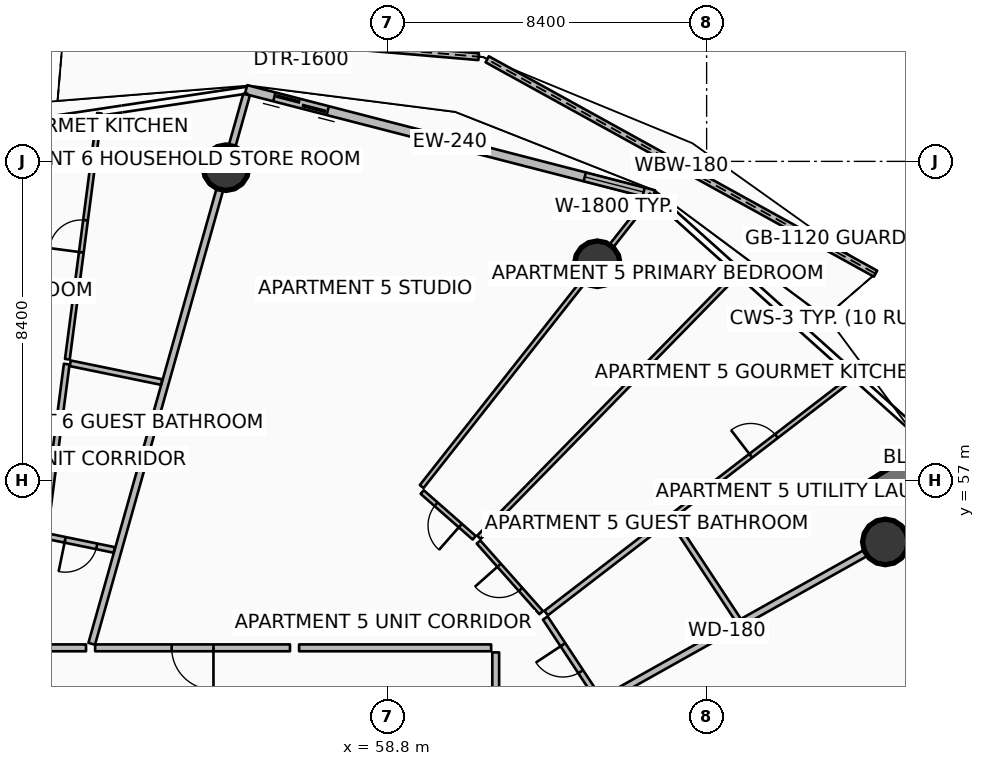
"""IFC4 building model, lengths in metres.
Left out: names, types, materials, properties, quantities, classifications, styles, units other than length and angle.
Written with IfcOpenShell. Run it as: python <this file> out.ifc"""

import sys

from ifc_helpers import new_model, si_unit, direction, frame, frame_2d, origin, origin_2d, place, context, subcontext, project, spatial, polyline, rectangle, circle, outline, extrude, element, fill, save


model = new_model("IFC4")
c1 = context("Model", 3, precision=1e-05, world=origin(), true_north=direction((0.0, 1.0)))
c2 = subcontext(c1, "Body", "Model", "MODEL_VIEW")
j1 = project(units=[si_unit("LENGTHUNIT", "METRE"), si_unit("PLANEANGLEUNIT", "RADIAN")], contexts=[c1])
p1 = place(None, origin())
s1 = spatial("IfcSite", under=j1, at=p1, CompositionType="ELEMENT")
p2 = place(p1, origin())
s2 = spatial("IfcBuilding", under=s1, at=p2, CompositionType="ELEMENT")
p3 = place(p2, frame((0.0, 0.0, 86.4)))
s3 = spatial("IfcBuildingStorey", under=s2, at=p3, CompositionType="ELEMENT", Elevation=86.4)
p4 = place(p3, frame((71.469, 56.665, 0.0), z_axis=(0.0, 0.0, 1.0), x_axis=(0.848053161125, 0.529911158502, 0.0)))
e1 = element("IfcWall", 1, at=p4, inside=s3, PredefinedType="SOLIDWALL", context=c2, shape_type="SweptSolid", body=[
    extrude(rectangle(XDim=3.5, YDim=0.55, at=frame_2d((1.75, 0.0))), origin(), (0.0, 0.0, 1.0), 3.75),
])
for number, where, z_axis, x_axis in (
    (2, (71.903, 55.386, 0.0), (0.0, 0.0, 1.0), (1.0, 0.0, 0.0)),
    (3, (64.323, 62.706, 0.0), (0.0, 0.0, 1.0), (1.0, 0.0, 0.0)),
    (4, (54.553, 65.234, 0.0), (0.0, 0.0, 1.0), (1.0, 0.0, 0.0)),
):
    element("IfcColumn", number, at=place(p3, frame(where, z_axis=z_axis, x_axis=x_axis)), inside=s3, PredefinedType="COLUMN", context=c2, shape_type="SweptSolid", body=[
        extrude(circle(Radius=0.6, at=origin_2d()), origin(), (0.0, 0.0, 1.0), 3.5),
    ])
p5 = place(p3, frame((71.644, 62.445, 0.0), z_axis=(0.0, 0.0, 1.0), x_axis=(-0.875456537623, 0.483296855704, 0.0)))
e5 = element("IfcWall", 5, at=p5, inside=s3, PredefinedType="PARAPET", context=c2, shape_type="SweptSolid", body=[
    extrude(outline(polyline([(0.0, 0.0), (11.672, 0.0), (11.672, 1.148), (5.836, 1.127), (0.0, 1.224), (0.0, 0.0)])), frame((0.0, 0.09, 0.0), z_axis=(0.0, -1.0, 0.0), x_axis=(1.0, 0.0, 0.0)), (0.0, 0.0, 1.0), 0.18),
])
p6 = place(p3, frame((61.201, 68.154, 0.0), z_axis=(0.0, 0.0, 1.0), x_axis=(-0.996375069037, 0.08506892383, 0.0)))
e6 = element("IfcWall", 6, at=p6, inside=s3, PredefinedType="PARAPET", context=c2, shape_type="SweptSolid", body=[
    extrude(outline(polyline([(0.0, 0.0), (10.943, 0.0), (10.943, 1.483), (5.471, 1.284), (0.0, 1.148), (0.0, 0.0)])), frame((0.0, 0.09, 0.0), z_axis=(0.0, -1.0, 0.0), x_axis=(1.0, 0.0, 0.0)), (0.0, 0.0, 1.0), 0.18),
])
p7 = place(p3, frame((65.814, 64.523, 0.0), z_axis=(0.0, 0.0, 1.0), x_axis=(-0.968356180858, 0.249572248045, 0.0)))
e7 = element("IfcWall", 7, at=p7, inside=s3, PredefinedType="SOLIDWALL", context=c2, shape_type="SweptSolid", body=[
    extrude(rectangle(XDim=11.084, YDim=0.24, at=frame_2d((5.542, 0.0))), origin(), (0.0, 0.0, 1.0), 2.45),
])
p8 = place(p7, frame((8.865, 0.0, 0.0)))
e8 = element("IfcOpeningElement", 8, at=p8, cuts=e7, PredefinedType="OPENING", context=c2, shape_type="SweptSolid", body=[
    extrude(rectangle(XDim=1.45, YDim=2.15, at=frame_2d((0.725, 1.075))), frame((0.0, 0.13, 0.0), z_axis=(0.0, -1.0, 0.0), x_axis=(1.0, 0.0, 0.0)), (0.0, 0.0, 1.0), 0.26),
])
p9 = place(p7, frame((0.28, 0.0, 0.65)))
e9 = element("IfcOpeningElement", 9, at=p9, cuts=e7, PredefinedType="OPENING", context=c2, shape_type="SweptSolid", body=[
    extrude(rectangle(XDim=1.6, YDim=1.5, at=frame_2d((0.8, 0.75))), frame((0.0, 0.13, 0.0), z_axis=(0.0, -1.0, 0.0), x_axis=(1.0, 0.0, 0.0)), (0.0, 0.0, 1.0), 0.26),
])
p10 = place(p3, frame((61.746, 49.698, 0.0), z_axis=(0.0, 0.0, 1.0), x_axis=(0.872489938668, 0.488632077256, 0.0)))
e10 = element("IfcWall", 10, at=p10, inside=s3, PredefinedType="PARTITIONING", context=c2, shape_type="SweptSolid", body=[
    extrude(rectangle(XDim=13.725, YDim=0.18, at=frame_2d((6.862, 0.0))), origin(), (0.0, 0.0, 1.0), 2.94),
])
p11 = place(p3, frame((51.019, 52.706, 0.0), z_axis=(0.0, 0.0, 1.0), x_axis=(0.271450895995, 0.962452290279, 0.0)))
e11 = element("IfcWall", 11, at=p11, inside=s3, PredefinedType="PARTITIONING", context=c2, shape_type="SweptSolid", body=[
    extrude(rectangle(XDim=15.014, YDim=0.18, at=frame_2d((7.507, 0.0))), origin(), (0.0, 0.0, 1.0), 2.94),
])
p12 = place(p3, frame((56.236, 52.6, 0.0), z_axis=(0.0, 0.0, 1.0), x_axis=(-1.0, 0.0, 0.0)))
e12 = element("IfcWall", 12, at=p12, inside=s3, PredefinedType="PARTITIONING", context=c2, shape_type="SweptSolid", body=[
    extrude(rectangle(XDim=5.127, YDim=0.18, at=frame_2d((2.563, 0.0))), origin(), (0.0, 0.0, 1.0), 2.94),
])
p13 = place(p12, frame((2.013, 0.0, 0.0)))
e13 = element("IfcOpeningElement", 13, at=p13, cuts=e12, PredefinedType="OPENING", context=c2, shape_type="SweptSolid", body=[
    extrude(rectangle(XDim=1.1, YDim=2.1, at=frame_2d((0.55, 1.05))), frame((0.0, 0.1, 0.0), z_axis=(0.0, -1.0, 0.0), x_axis=(1.0, 0.0, 0.0)), (0.0, 0.0, 1.0), 0.2),
])
p14 = place(p3, frame((61.65, 49.764, 0.0), z_axis=(0.0, 0.0, 1.0), x_axis=(0.0, 1.0, 0.0)))
e14 = element("IfcWall", 14, at=p14, inside=s3, PredefinedType="PARTITIONING", context=c2, shape_type="SweptSolid", body=[
    extrude(rectangle(XDim=2.716, YDim=0.18, at=frame_2d((1.358, 0.0))), origin(), (0.0, 0.0, 1.0), 2.94),
])
p15 = place(p3, frame((61.53, 52.6, 0.0), z_axis=(0.0, 0.0, 1.0), x_axis=(-1.0, 0.0, 0.0)))
e15 = element("IfcWall", 15, at=p15, inside=s3, PredefinedType="PARTITIONING", context=c2, shape_type="SweptSolid", body=[
    extrude(rectangle(XDim=5.054, YDim=0.18, at=frame_2d((2.527, 0.0))), origin(), (0.0, 0.0, 1.0), 2.94),
])
p16 = place(p3, frame((59.702, 56.844, 0.0), z_axis=(0.0, 0.0, 1.0), x_axis=(0.619083405129, 0.785325243128, 0.0)))
e16 = element("IfcWall", 16, at=p16, inside=s3, PredefinedType="PARTITIONING", context=c2, shape_type="SweptSolid", body=[
    extrude(rectangle(XDim=9.769, YDim=0.125, at=frame_2d((4.885, 0.0))), origin(), (0.0, 0.0, 1.0), 2.94),
])
p17 = place(p3, frame((64.35, 51.271, 0.0), z_axis=(0.0, 0.0, 1.0), x_axis=(-0.550510405652, 0.83482830167, 0.0)))
e17 = element("IfcWall", 17, at=p17, inside=s3, PredefinedType="PARTITIONING", context=c2, shape_type="SweptSolid", body=[
    extrude(rectangle(XDim=2.532, YDim=0.15, at=frame_2d((1.266, 0.0))), origin(), (0.0, 0.0, 1.0), 2.94),
])
p18 = place(p17, frame((0.841, 0.0, 0.0)))
e18 = element("IfcOpeningElement", 18, at=p18, cuts=e17, PredefinedType="OPENING", context=c2, shape_type="SweptSolid", body=[
    extrude(rectangle(XDim=0.85, YDim=2.06, at=frame_2d((0.425, 1.03))), frame((0.0, 0.085, 0.0), z_axis=(0.0, -1.0, 0.0), x_axis=(1.0, 0.0, 0.0)), (0.0, 0.0, 1.0), 0.17),
])
p19 = place(p3, frame((68.031, 53.333, 0.0), z_axis=(0.0, 0.0, 1.0), x_axis=(-0.550480727927, 0.83484787128, 0.0)))
e19 = element("IfcWall", 19, at=p19, inside=s3, PredefinedType="PARTITIONING", context=c2, shape_type="SweptSolid", body=[
    extrude(rectangle(XDim=3.143, YDim=0.15, at=frame_2d((1.572, 0.0))), origin(), (0.0, 0.0, 1.0), 2.94),
])
p20 = place(p3, frame((62.978, 53.514, 0.0), z_axis=(0.0, 0.0, 1.0), x_axis=(0.792801485355, 0.609479946199, 0.0)))
e20 = element("IfcWall", 20, at=p20, inside=s3, PredefinedType="PARTITIONING", context=c2, shape_type="SweptSolid", body=[
    extrude(rectangle(XDim=4.09, YDim=0.15, at=frame_2d((2.045, 0.0))), origin(), (0.0, 0.0, 1.0), 2.94),
])
p21 = place(p3, frame((66.323, 56.086, 0.0), z_axis=(0.0, 0.0, 1.0), x_axis=(0.792792040596, 0.60949223159, 0.0)))
e21 = element("IfcWall", 21, at=p21, inside=s3, PredefinedType="PARTITIONING", context=c2, shape_type="SweptSolid", body=[
    extrude(rectangle(XDim=5.994, YDim=0.125, at=frame_2d((2.997, 0.0))), origin(), (0.0, 0.0, 1.0), 2.94),
])
p22 = place(p21, frame((2.572, 0.0, 0.0)))
e22 = element("IfcOpeningElement", 22, at=p22, cuts=e21, PredefinedType="OPENING", context=c2, shape_type="SweptSolid", body=[
    extrude(rectangle(XDim=0.85, YDim=2.06, at=frame_2d((0.425, 1.03))), frame((0.0, 0.073, 0.0), z_axis=(0.0, -1.0, 0.0), x_axis=(1.0, 0.0, 0.0)), (0.0, 0.0, 1.0), 0.145),
])
p23 = place(p3, frame((61.208, 55.508, 0.0), z_axis=(0.0, 0.0, 1.0), x_axis=(0.699096858951, 0.715026979774, 0.0)))
e23 = element("IfcWall", 23, at=p23, inside=s3, PredefinedType="PARTITIONING", context=c2, shape_type="SweptSolid", body=[
    extrude(rectangle(XDim=9.747, YDim=0.125, at=frame_2d((4.874, 0.0))), origin(), (0.0, 0.0, 1.0), 2.94),
])
p24 = place(p3, frame((62.846, 53.527, 0.0), z_axis=(0.0, 0.0, 1.0), x_axis=(-0.663881646848, 0.747837655497, 0.0)))
e24 = element("IfcWall", 24, at=p24, inside=s3, PredefinedType="PARTITIONING", context=c2, shape_type="SweptSolid", body=[
    extrude(rectangle(XDim=2.483, YDim=0.125, at=frame_2d((1.242, 0.0))), origin(), (0.0, 0.0, 1.0), 2.94),
])
p25 = place(p24, frame((0.817, 0.0, 0.0)))
e25 = element("IfcOpeningElement", 25, at=p25, cuts=e24, PredefinedType="OPENING", context=c2, shape_type="SweptSolid", body=[
    extrude(rectangle(XDim=0.85, YDim=2.06, at=frame_2d((0.425, 1.03))), frame((0.0, 0.073, 0.0), z_axis=(0.0, -1.0, 0.0), x_axis=(1.0, 0.0, 0.0)), (0.0, 0.0, 1.0), 0.145),
])
p26 = place(p3, frame((61.084, 55.497, 0.0), z_axis=(0.0, 0.0, 1.0), x_axis=(-0.75124742024, 0.660020691784, 0.0)))
e26 = element("IfcWall", 26, at=p26, inside=s3, PredefinedType="PARTITIONING", context=c2, shape_type="SweptSolid", body=[
    extrude(rectangle(XDim=1.823, YDim=0.125, at=frame_2d((0.911, 0.0))), origin(), (0.0, 0.0, 1.0), 2.94),
])
p27 = place(p26, frame((0.486, 0.0, 0.0)))
e27 = element("IfcOpeningElement", 27, at=p27, cuts=e26, PredefinedType="OPENING", context=c2, shape_type="SweptSolid", body=[
    extrude(rectangle(XDim=0.85, YDim=2.06, at=frame_2d((0.425, 1.03))), frame((0.0, 0.073, 0.0), z_axis=(0.0, -1.0, 0.0), x_axis=(1.0, 0.0, 0.0)), (0.0, 0.0, 1.0), 0.145),
])
p28 = place(p3, frame((50.869, 52.6, 0.0), z_axis=(0.0, 0.0, 1.0), x_axis=(-1.0, 0.0, 0.0)))
e28 = element("IfcWall", 28, at=p28, inside=s3, PredefinedType="PARTITIONING", context=c2, shape_type="SweptSolid", body=[
    extrude(rectangle(XDim=4.004, YDim=0.18, at=frame_2d((2.002, 0.0))), origin(), (0.0, 0.0, 1.0), 2.94),
])
p29 = place(p3, frame((51.612, 55.176, 0.0), z_axis=(0.0, 0.0, 1.0), x_axis=(-0.979559973395, 0.201152326663, 0.0)))
e29 = element("IfcWall", 29, at=p29, inside=s3, PredefinedType="PARTITIONING", context=c2, shape_type="SweptSolid", body=[
    extrude(rectangle(XDim=1.789, YDim=0.15, at=frame_2d((0.895, 0.0))), origin(), (0.0, 0.0, 1.0), 2.94),
])
p30 = place(p29, frame((0.469, 0.0, 0.0)))
e30 = element("IfcOpeningElement", 30, at=p30, cuts=e29, PredefinedType="OPENING", context=c2, shape_type="SweptSolid", body=[
    extrude(rectangle(XDim=0.85, YDim=2.06, at=frame_2d((0.425, 1.03))), frame((0.0, 0.085, 0.0), z_axis=(0.0, -1.0, 0.0), x_axis=(1.0, 0.0, 0.0)), (0.0, 0.0, 1.0), 0.17),
])
p31 = place(p3, frame((52.858, 59.594, 0.0), z_axis=(0.0, 0.0, 1.0), x_axis=(-0.979569035828, 0.201108189903, 0.0)))
e31 = element("IfcWall", 31, at=p31, inside=s3, PredefinedType="PARTITIONING", context=c2, shape_type="SweptSolid", body=[
    extrude(rectangle(XDim=2.453, YDim=0.15, at=frame_2d((1.227, 0.0))), origin(), (0.0, 0.0, 1.0), 2.94),
])
p32 = place(p3, frame((49.783, 55.643, 0.0), z_axis=(0.0, 0.0, 1.0), x_axis=(0.129624682181, 0.991563130501, 0.0)))
e32 = element("IfcWall", 32, at=p32, inside=s3, PredefinedType="PARTITIONING", context=c2, shape_type="SweptSolid", body=[
    extrude(rectangle(XDim=4.46, YDim=0.15, at=frame_2d((2.23, 0.0))), origin(), (0.0, 0.0, 1.0), 2.94),
])
p33 = place(p3, frame((50.378, 60.194, 0.0), z_axis=(0.0, 0.0, 1.0), x_axis=(0.129622249643, 0.991563448498, 0.0)))
e33 = element("IfcWall", 33, at=p33, inside=s3, PredefinedType="PARTITIONING", context=c2, shape_type="SweptSolid", body=[
    extrude(rectangle(XDim=6.526, YDim=0.125, at=frame_2d((3.263, 0.0))), origin(), (0.0, 0.0, 1.0), 2.94),
])
p34 = place(p33, frame((2.838, 0.0, 0.0)))
e34 = element("IfcOpeningElement", 34, at=p34, cuts=e33, PredefinedType="OPENING", context=c2, shape_type="SweptSolid", body=[
    extrude(rectangle(XDim=0.85, YDim=2.06, at=frame_2d((0.425, 1.03))), frame((0.0, 0.073, 0.0), z_axis=(0.0, -1.0, 0.0), x_axis=(1.0, 0.0, 0.0)), (0.0, 0.0, 1.0), 0.145),
])
p35 = place(p8, origin())
e35 = element("IfcDoor", 35, at=p35, inside=s3, OperationType="DOUBLE_DOOR_SLIDING", PredefinedType="DOOR", context=c2, shape_type="SweptSolid", body=[
    extrude(rectangle(XDim=1.45, YDim=2.15, at=frame_2d((0.725, 1.075))), frame((0.0, 0.025, 0.0), z_axis=(0.0, -1.0, 0.0), x_axis=(1.0, 0.0, 0.0)), (0.0, 0.0, 1.0), 0.05),
])
fill(e8, e35)
p36 = place(p9, origin())
e36 = element("IfcWindow", 36, at=p36, inside=s3, PartitioningType="SINGLE_PANEL", PredefinedType="WINDOW", context=c2, shape_type="SweptSolid", body=[
    extrude(rectangle(XDim=1.6, YDim=1.5, at=frame_2d((0.8, 0.75))), frame((0.0, 0.03, 0.0), z_axis=(0.0, -1.0, 0.0), x_axis=(1.0, 0.0, 0.0)), (0.0, 0.0, 1.0), 0.06),
])
fill(e9, e36)
p37 = place(p13, origin())
e37 = element("IfcDoor", 37, at=p37, inside=s3, OperationType="SINGLE_SWING_LEFT", PredefinedType="DOOR", context=c2, shape_type="SweptSolid", body=[
    extrude(rectangle(XDim=1.1, YDim=2.1, at=frame_2d((0.55, 1.05))), frame((0.0, 0.025, 0.0), z_axis=(0.0, -1.0, 0.0), x_axis=(1.0, 0.0, 0.0)), (0.0, 0.0, 1.0), 0.05),
])
fill(e13, e37)
p38 = place(p18, origin())
e38 = element("IfcDoor", 38, at=p38, inside=s3, OperationType="SINGLE_SWING_RIGHT", PredefinedType="DOOR", context=c2, shape_type="SweptSolid", body=[
    extrude(rectangle(XDim=0.85, YDim=2.06, at=frame_2d((0.425, 1.03))), frame((0.0, 0.025, 0.0), z_axis=(0.0, -1.0, 0.0), x_axis=(1.0, 0.0, 0.0)), (0.0, 0.0, 1.0), 0.05),
])
fill(e18, e38)
p39 = place(p22, origin())
e39 = element("IfcDoor", 39, at=p39, inside=s3, OperationType="SINGLE_SWING_LEFT", PredefinedType="DOOR", context=c2, shape_type="SweptSolid", body=[
    extrude(rectangle(XDim=0.85, YDim=2.06, at=frame_2d((0.425, 1.03))), frame((0.0, 0.025, 0.0), z_axis=(0.0, -1.0, 0.0), x_axis=(1.0, 0.0, 0.0)), (0.0, 0.0, 1.0), 0.05),
])
fill(e22, e39)
p40 = place(p25, origin())
e40 = element("IfcDoor", 40, at=p40, inside=s3, OperationType="SINGLE_SWING_RIGHT", PredefinedType="DOOR", context=c2, shape_type="SweptSolid", body=[
    extrude(rectangle(XDim=0.85, YDim=2.06, at=frame_2d((0.425, 1.03))), frame((0.0, 0.025, 0.0), z_axis=(0.0, -1.0, 0.0), x_axis=(1.0, 0.0, 0.0)), (0.0, 0.0, 1.0), 0.05),
])
fill(e25, e40)
p41 = place(p27, origin())
e41 = element("IfcDoor", 41, at=p41, inside=s3, OperationType="SINGLE_SWING_LEFT", PredefinedType="DOOR", context=c2, shape_type="SweptSolid", body=[
    extrude(rectangle(XDim=0.85, YDim=2.06, at=frame_2d((0.425, 1.03))), frame((0.0, 0.025, 0.0), z_axis=(0.0, -1.0, 0.0), x_axis=(1.0, 0.0, 0.0)), (0.0, 0.0, 1.0), 0.05),
])
fill(e27, e41)
p42 = place(p30, origin())
e42 = element("IfcDoor", 42, at=p42, inside=s3, OperationType="SINGLE_SWING_RIGHT", PredefinedType="DOOR", context=c2, shape_type="SweptSolid", body=[
    extrude(rectangle(XDim=0.85, YDim=2.06, at=frame_2d((0.425, 1.03))), frame((0.0, 0.025, 0.0), z_axis=(0.0, -1.0, 0.0), x_axis=(1.0, 0.0, 0.0)), (0.0, 0.0, 1.0), 0.05),
])
fill(e30, e42)
p43 = place(p34, origin())
e43 = element("IfcDoor", 43, at=p43, inside=s3, OperationType="SINGLE_SWING_LEFT", PredefinedType="DOOR", context=c2, shape_type="SweptSolid", body=[
    extrude(rectangle(XDim=0.85, YDim=2.06, at=frame_2d((0.425, 1.03))), frame((0.0, 0.025, 0.0), z_axis=(0.0, -1.0, 0.0), x_axis=(1.0, 0.0, 0.0)), (0.0, 0.0, 1.0), 0.05),
])
fill(e34, e43)
save(model, sys.argv[1])
